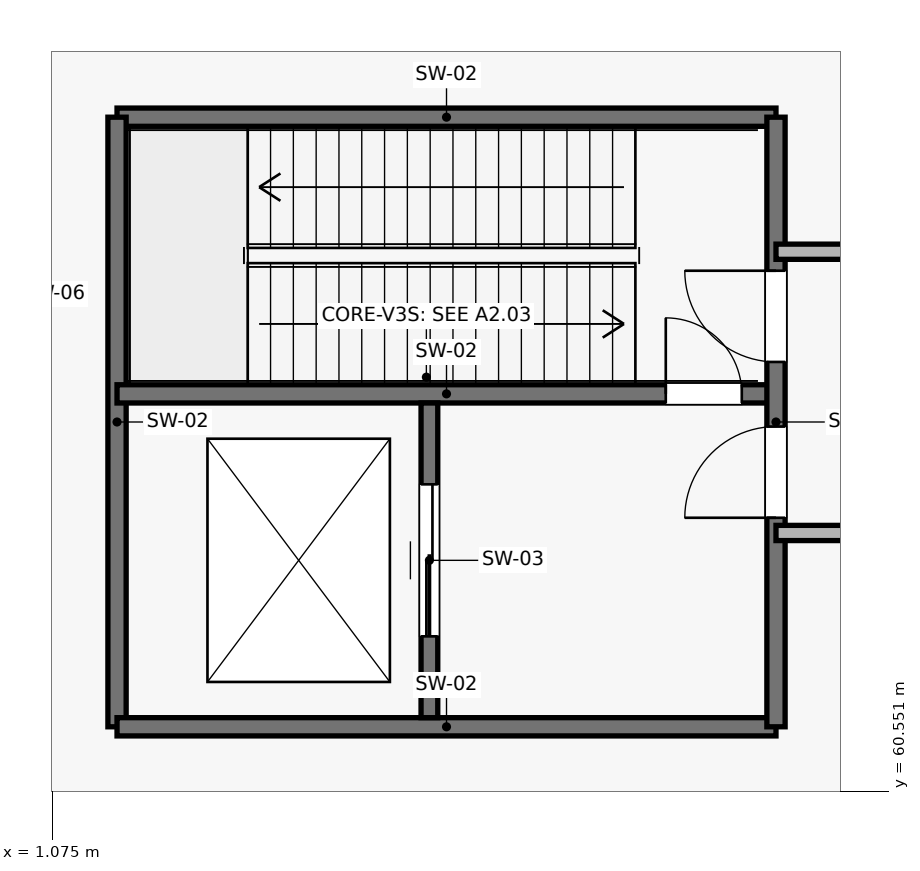
"""IFC4 building model, lengths in metres.
Left out: names, types, materials, properties, quantities, classifications, styles, units other than length and angle.
Written with IfcOpenShell. Run it as: python <this file> out.ifc"""

import sys

from ifc_helpers import new_model, si_unit, direction, frame, frame_2d, origin, place, context, subcontext, project, spatial, rectangle, extrude, element, fill, save


model = new_model("IFC4")
c1 = context("Model", 3, precision=1e-05, world=origin(), true_north=direction((0.0, 1.0)))
c2 = subcontext(c1, "Body", "Model", "MODEL_VIEW")
j1 = project(units=[si_unit("LENGTHUNIT", "METRE"), si_unit("PLANEANGLEUNIT", "RADIAN")], contexts=[c1])
p1 = place(None, origin())
s1 = spatial("IfcSite", under=j1, at=p1, CompositionType="ELEMENT")
p2 = place(p1, origin())
s2 = spatial("IfcBuilding", under=s1, at=p2, CompositionType="ELEMENT")
p3 = place(p2, origin())
s3 = spatial("IfcBuildingStorey", under=s2, at=p3, CompositionType="ELEMENT", Elevation=0.0)
p4 = place(p3, frame((10.6, 69.42, 0.0), z_axis=(0.0, 0.0, 1.0), x_axis=(-1.0, 0.0, 0.0)))
e1 = element("IfcWall", 1, at=p4, inside=s3, PredefinedType="SHEAR", context=c2, shape_type="SweptSolid", body=[
    extrude(rectangle(XDim=8.67, YDim=0.24, at=frame_2d((4.335, 0.0))), origin(), (0.0, 0.0, 1.0), 6.26),
])
p5 = place(p3, frame((1.93, 69.42, 0.0), z_axis=(0.0, 0.0, 1.0), x_axis=(0.0, -1.0, 0.0)))
e2 = element("IfcWall", 2, at=p5, inside=s3, PredefinedType="SHEAR", context=c2, shape_type="SweptSolid", body=[
    extrude(rectangle(XDim=8.02, YDim=0.24, at=frame_2d((4.01, 0.0))), origin(), (0.0, 0.0, 1.0), 6.26),
])
p6 = place(p3, frame((1.93, 61.4, 0.0), z_axis=(0.0, 0.0, 1.0), x_axis=(1.0, 0.0, 0.0)))
e3 = element("IfcWall", 3, at=p6, inside=s3, PredefinedType="SHEAR", context=c2, shape_type="SweptSolid", body=[
    extrude(rectangle(XDim=8.67, YDim=0.24, at=frame_2d((4.335, 0.0))), origin(), (0.0, 0.0, 1.0), 6.26),
])
p7 = place(p3, frame((1.93, 65.78, 0.0), z_axis=(0.0, 0.0, 1.0), x_axis=(1.0, 0.0, 0.0)))
e4 = element("IfcWall", 4, at=p7, inside=s3, PredefinedType="SHEAR", context=c2, shape_type="SweptSolid", body=[
    extrude(rectangle(XDim=8.67, YDim=0.24, at=frame_2d((4.335, 0.0))), origin(), (0.0, 0.0, 1.0), 6.26),
])
p8 = place(p7, frame((7.22, 0.0, 0.0)))
e5 = element("IfcOpeningElement", 5, at=p8, cuts=e4, PredefinedType="OPENING", context=c2, shape_type="SweptSolid", body=[
    extrude(rectangle(XDim=1.0, YDim=2.2, at=frame_2d((0.5, 1.1))), frame((0.0, 0.135, 0.0), z_axis=(0.0, -1.0, 0.0), x_axis=(1.0, 0.0, 0.0)), (0.0, 0.0, 1.0), 0.27),
])
p9 = place(p3, frame((10.6, 61.4, 0.0), z_axis=(0.0, 0.0, 1.0), x_axis=(0.0, 1.0, 0.0)))
e6 = element("IfcWall", 6, at=p9, inside=s3, PredefinedType="SHEAR", context=c2, shape_type="SweptSolid", body=[
    extrude(rectangle(XDim=8.02, YDim=0.24, at=frame_2d((4.01, 0.0))), origin(), (0.0, 0.0, 1.0), 6.26),
])
p10 = place(p9, frame((2.75, 0.0, 0.0)))
e7 = element("IfcOpeningElement", 7, at=p10, cuts=e6, PredefinedType="OPENING", context=c2, shape_type="SweptSolid", body=[
    extrude(rectangle(XDim=1.2, YDim=2.2, at=frame_2d((0.6, 1.1))), frame((0.0, 0.135, 0.0), z_axis=(0.0, -1.0, 0.0), x_axis=(1.0, 0.0, 0.0)), (0.0, 0.0, 1.0), 0.27),
])
p11 = place(p9, frame((4.8, 0.0, 0.0)))
e8 = element("IfcOpeningElement", 8, at=p11, cuts=e6, PredefinedType="OPENING", context=c2, shape_type="SweptSolid", body=[
    extrude(rectangle(XDim=1.2, YDim=2.2, at=frame_2d((0.6, 1.1))), frame((0.0, 0.135, 0.0), z_axis=(0.0, -1.0, 0.0), x_axis=(1.0, 0.0, 0.0)), (0.0, 0.0, 1.0), 0.27),
])
p12 = place(p3, frame((6.04, 61.52, 0.0), z_axis=(0.0, 0.0, 1.0), x_axis=(0.0, 1.0, 0.0)))
e9 = element("IfcWall", 9, at=p12, inside=s3, PredefinedType="SHEAR", context=c2, shape_type="SweptSolid", body=[
    extrude(rectangle(XDim=4.14, YDim=0.22, at=frame_2d((2.07, 0.0))), origin(), (0.0, 0.0, 1.0), 6.26),
])
p13 = place(p12, frame((1.07, 0.0, 0.0)))
e10 = element("IfcOpeningElement", 10, at=p13, cuts=e9, PredefinedType="OPENING", context=c2, shape_type="SweptSolid", body=[
    extrude(rectangle(XDim=2.0, YDim=2.4, at=frame_2d((1.0, 1.2))), frame((0.0, 0.125, 0.0), z_axis=(0.0, -1.0, 0.0), x_axis=(1.0, 0.0, 0.0)), (0.0, 0.0, 1.0), 0.25),
])
for number, where, z_axis, x_axis in (
    (11, (10.6, 63.95, 0.0), (0.0, 0.0, 1.0), (1.0, 0.0, 0.0)),
    (12, (10.6, 67.65, 0.0), (0.0, 0.0, 1.0), (1.0, 0.0, 0.0)),
):
    element("IfcWall", number, at=place(p3, frame(where, z_axis=z_axis, x_axis=x_axis)), inside=s3, PredefinedType="PARTITIONING", context=c2, shape_type="SweptSolid", body=[
        extrude(rectangle(XDim=7.6, YDim=0.2, at=frame_2d((3.8, 0.0))), origin(), (0.0, 0.0, 1.0), 5.593),
    ])
p14 = place(p10, origin())
e13 = element("IfcDoor", 13, at=p14, inside=s3, OperationType="SINGLE_SWING_LEFT", PredefinedType="DOOR", context=c2, shape_type="SweptSolid", body=[
    extrude(rectangle(XDim=1.2, YDim=2.2, at=frame_2d((0.6, 1.1))), frame((0.0, 0.025, 0.0), z_axis=(0.0, -1.0, 0.0), x_axis=(1.0, 0.0, 0.0)), (0.0, 0.0, 1.0), 0.05),
])
fill(e7, e13)
p15 = place(p11, origin())
e14 = element("IfcDoor", 14, at=p15, inside=s3, OperationType="SINGLE_SWING_RIGHT", PredefinedType="DOOR", context=c2, shape_type="SweptSolid", body=[
    extrude(rectangle(XDim=1.2, YDim=2.2, at=frame_2d((0.6, 1.1))), frame((0.0, 0.025, 0.0), z_axis=(0.0, -1.0, 0.0), x_axis=(1.0, 0.0, 0.0)), (0.0, 0.0, 1.0), 0.05),
])
fill(e8, e14)
p16 = place(p8, origin())
e15 = element("IfcDoor", 15, at=p16, inside=s3, OperationType="SINGLE_SWING_LEFT", PredefinedType="DOOR", context=c2, shape_type="SweptSolid", body=[
    extrude(rectangle(XDim=1.0, YDim=2.2, at=frame_2d((0.5, 1.1))), frame((0.0, 0.025, 0.0), z_axis=(0.0, -1.0, 0.0), x_axis=(1.0, 0.0, 0.0)), (0.0, 0.0, 1.0), 0.05),
])
fill(e5, e15)
p17 = place(p13, origin())
e16 = element("IfcDoor", 16, at=p17, inside=s3, OperationType="DOUBLE_DOOR_SLIDING", PredefinedType="DOOR", context=c2, shape_type="SweptSolid", body=[
    extrude(rectangle(XDim=2.0, YDim=2.4, at=frame_2d((1.0, 1.2))), frame((0.0, 0.025, 0.0), z_axis=(0.0, -1.0, 0.0), x_axis=(1.0, 0.0, 0.0)), (0.0, 0.0, 1.0), 0.05),
])
fill(e10, e16)
save(model, sys.argv[1])
